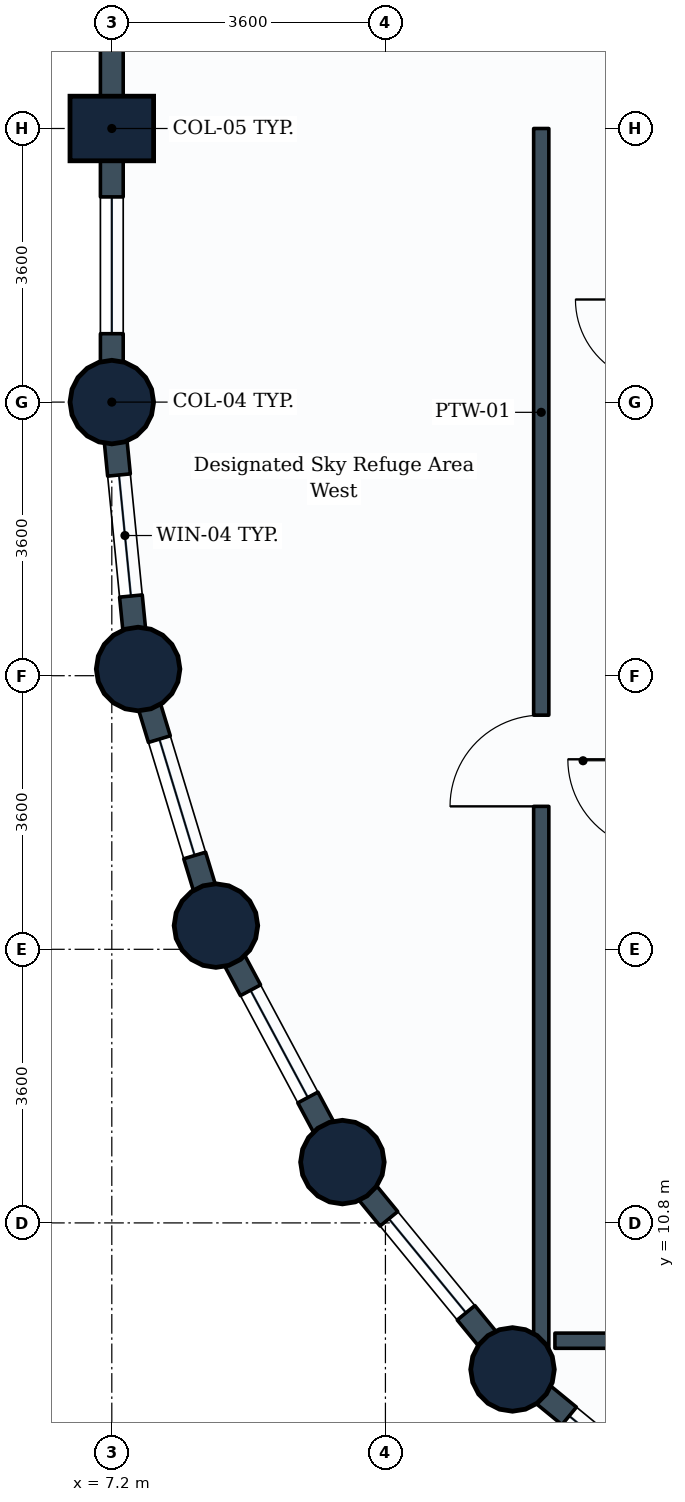
"""IFC4 building model, lengths in metres.
Left out: names, types, materials, properties, quantities, classifications, styles, units other than length and angle.
Written with IfcOpenShell. Run it as: python <this file> out.ifc"""

import sys

from ifc_helpers import new_model, si_unit, direction, frame, frame_2d, origin, origin_2d, place, context, subcontext, project, spatial, rectangle, circle, extrude, element, fill, save


model = new_model("IFC4")
c1 = context("Model", 3, precision=1e-05, world=origin(), true_north=direction((0.0, 1.0)))
c2 = subcontext(c1, "Body", "Model", "MODEL_VIEW")
j1 = project(units=[si_unit("LENGTHUNIT", "METRE"), si_unit("PLANEANGLEUNIT", "RADIAN")], contexts=[c1])
p1 = place(None, origin())
s1 = spatial("IfcSite", under=j1, at=p1, CompositionType="ELEMENT")
p2 = place(p1, origin())
s2 = spatial("IfcBuilding", under=s1, at=p2, CompositionType="ELEMENT")
p3 = place(p2, frame((0.0, 0.0, 120.0)))
s3 = spatial("IfcBuildingStorey", under=s2, at=p3, CompositionType="ELEMENT", Elevation=120.0)
p4 = place(p3, frame((7.2, 21.6, 0.0), z_axis=(0.0, 0.0, 1.0), x_axis=(1.0, 0.0, 0.0)))
e1 = element("IfcColumn", 1, at=p4, inside=s3, PredefinedType="COLUMN", context=c2, shape_type="SweptSolid", body=[
    extrude(circle(Radius=0.55, at=origin_2d()), origin(), (0.0, 0.0, 1.0), 3.8),
])
p5 = place(p3, frame((7.2, 25.2, 0.0), z_axis=(0.0, 0.0, 1.0), x_axis=(0.0, 1.0, 0.0)))
e2 = element("IfcColumn", 2, at=p5, inside=s3, PredefinedType="COLUMN", context=c2, shape_type="SweptSolid", body=[
    extrude(rectangle(XDim=0.85, YDim=1.1, at=origin_2d()), origin(), (0.0, 0.0, 1.0), 3.8),
])
for number, where, z_axis, x_axis in (
    (3, (7.546, 18.088, 0.0), (0.0, 0.0, 1.0), (1.0, 0.0, 0.0)),
    (4, (8.57, 14.712, 0.0), (0.0, 0.0, 1.0), (1.0, 0.0, 0.0)),
    (5, (10.234, 11.6, 0.0), (0.0, 0.0, 1.0), (1.0, 0.0, 0.0)),
    (6, (12.472, 8.872, 0.0), (0.0, 0.0, 1.0), (1.0, 0.0, 0.0)),
):
    element("IfcColumn", number, at=place(p3, frame(where, z_axis=z_axis, x_axis=x_axis)), inside=s3, PredefinedType="COLUMN", context=c2, shape_type="SweptSolid", body=[
        extrude(circle(Radius=0.55, at=origin_2d()), origin(), (0.0, 0.0, 1.0), 3.8),
    ])
p6 = place(p3, frame((7.2, 25.2, 0.0), z_axis=(0.0, 0.0, 1.0), x_axis=(0.0, 1.0, 0.0)))
e7 = element("IfcWall", 7, at=p6, inside=s3, PredefinedType="STANDARD", context=c2, shape_type="SweptSolid", body=[
    extrude(rectangle(XDim=3.6, YDim=0.3, at=frame_2d((1.8, 0.0))), origin(), (0.0, 0.0, 1.0), 2.93),
])
p7 = place(p3, frame((7.2, 21.6, 0.0), z_axis=(0.0, 0.0, 1.0), x_axis=(0.0, 1.0, 0.0)))
e8 = element("IfcWall", 8, at=p7, inside=s3, PredefinedType="STANDARD", context=c2, shape_type="SweptSolid", body=[
    extrude(rectangle(XDim=3.6, YDim=0.3, at=frame_2d((1.8, 0.0))), origin(), (0.0, 0.0, 1.0), 2.93),
])
p8 = place(p7, frame((0.9, 0.0, 0.85)))
e9 = element("IfcOpeningElement", 9, at=p8, cuts=e8, PredefinedType="OPENING", context=c2, shape_type="SweptSolid", body=[
    extrude(rectangle(XDim=1.8, YDim=1.35, at=frame_2d((0.9, 0.675))), frame((0.0, 0.16, 0.0), z_axis=(0.0, -1.0, 0.0), x_axis=(1.0, 0.0, 0.0)), (0.0, 0.0, 1.0), 0.32),
])
p9 = place(p3, frame((7.546, 18.088, 0.0), z_axis=(0.0, 0.0, 1.0), x_axis=(-0.09802417461, 0.995184033831, 0.0)))
e10 = element("IfcWall", 10, at=p9, inside=s3, PredefinedType="STANDARD", context=c2, shape_type="SweptSolid", body=[
    extrude(rectangle(XDim=3.529, YDim=0.3, at=frame_2d((1.765, 0.0))), origin(), (0.0, 0.0, 1.0), 2.93),
])
p10 = place(p9, frame((0.965, 0.0, 0.85)))
e11 = element("IfcOpeningElement", 11, at=p10, cuts=e10, PredefinedType="OPENING", context=c2, shape_type="SweptSolid", body=[
    extrude(rectangle(XDim=1.6, YDim=1.35, at=frame_2d((0.8, 0.675))), frame((0.0, 0.16, 0.0), z_axis=(0.0, -1.0, 0.0), x_axis=(1.0, 0.0, 0.0)), (0.0, 0.0, 1.0), 0.32),
])
p11 = place(p3, frame((8.57, 14.712, 0.0), z_axis=(0.0, 0.0, 1.0), x_axis=(-0.290305086481, 0.956934144423, 0.0)))
e12 = element("IfcWall", 12, at=p11, inside=s3, PredefinedType="STANDARD", context=c2, shape_type="SweptSolid", body=[
    extrude(rectangle(XDim=3.528, YDim=0.3, at=frame_2d((1.764, 0.0))), origin(), (0.0, 0.0, 1.0), 2.93),
])
p12 = place(p11, frame((0.964, 0.0, 0.85)))
e13 = element("IfcOpeningElement", 13, at=p12, cuts=e12, PredefinedType="OPENING", context=c2, shape_type="SweptSolid", body=[
    extrude(rectangle(XDim=1.6, YDim=1.35, at=frame_2d((0.8, 0.675))), frame((0.0, 0.16, 0.0), z_axis=(0.0, -1.0, 0.0), x_axis=(1.0, 0.0, 0.0)), (0.0, 0.0, 1.0), 0.32),
])
p13 = place(p3, frame((10.234, 11.6, 0.0), z_axis=(0.0, 0.0, 1.0), x_axis=(-0.47151087309, 0.881860247748, 0.0)))
e14 = element("IfcWall", 14, at=p13, inside=s3, PredefinedType="STANDARD", context=c2, shape_type="SweptSolid", body=[
    extrude(rectangle(XDim=3.529, YDim=0.3, at=frame_2d((1.764, 0.0))), origin(), (0.0, 0.0, 1.0), 2.93),
])
p14 = place(p13, frame((0.964, 0.0, 0.85)))
e15 = element("IfcOpeningElement", 15, at=p14, cuts=e14, PredefinedType="OPENING", context=c2, shape_type="SweptSolid", body=[
    extrude(rectangle(XDim=1.6, YDim=1.35, at=frame_2d((0.8, 0.675))), frame((0.0, 0.16, 0.0), z_axis=(0.0, -1.0, 0.0), x_axis=(1.0, 0.0, 0.0)), (0.0, 0.0, 1.0), 0.32),
])
p15 = place(p3, frame((12.472, 8.872, 0.0), z_axis=(0.0, 0.0, 1.0), x_axis=(-0.634258295121, 0.773121216285, 0.0)))
e16 = element("IfcWall", 16, at=p15, inside=s3, PredefinedType="STANDARD", context=c2, shape_type="SweptSolid", body=[
    extrude(rectangle(XDim=3.529, YDim=0.3, at=frame_2d((1.764, 0.0))), origin(), (0.0, 0.0, 1.0), 2.93),
])
p16 = place(p15, frame((0.964, 0.0, 0.85)))
e17 = element("IfcOpeningElement", 17, at=p16, cuts=e16, PredefinedType="OPENING", context=c2, shape_type="SweptSolid", body=[
    extrude(rectangle(XDim=1.6, YDim=1.35, at=frame_2d((0.8, 0.675))), frame((0.0, 0.16, 0.0), z_axis=(0.0, -1.0, 0.0), x_axis=(1.0, 0.0, 0.0)), (0.0, 0.0, 1.0), 0.32),
])
p17 = place(p3, frame((15.2, 6.634, 0.0), z_axis=(0.0, 0.0, 1.0), x_axis=(-0.773121216285, 0.634258295121, 0.0)))
e18 = element("IfcWall", 18, at=p17, inside=s3, PredefinedType="STANDARD", context=c2, shape_type="SweptSolid", body=[
    extrude(rectangle(XDim=3.529, YDim=0.3, at=frame_2d((1.764, 0.0))), origin(), (0.0, 0.0, 1.0), 2.93),
])
p18 = place(p17, frame((0.964, 0.0, 0.85)))
e19 = element("IfcOpeningElement", 19, at=p18, cuts=e18, PredefinedType="OPENING", context=c2, shape_type="SweptSolid", body=[
    extrude(rectangle(XDim=1.6, YDim=1.35, at=frame_2d((0.8, 0.675))), frame((0.0, 0.16, 0.0), z_axis=(0.0, -1.0, 0.0), x_axis=(1.0, 0.0, 0.0)), (0.0, 0.0, 1.0), 0.32),
])
p19 = place(p3, frame((12.85, 8.716, 0.0), z_axis=(0.0, 0.0, 1.0), x_axis=(0.0, 1.0, 0.0)))
e20 = element("IfcWall", 20, at=p19, inside=s3, PredefinedType="PARTITIONING", context=c2, shape_type="SweptSolid", body=[
    extrude(rectangle(XDim=16.484, YDim=0.2, at=frame_2d((8.242, 0.0))), origin(), (0.0, 0.0, 1.0), 2.93),
])
p20 = place(p19, frame((7.565, 0.0, 0.0)))
e21 = element("IfcOpeningElement", 21, at=p20, cuts=e20, PredefinedType="OPENING", context=c2, shape_type="SweptSolid", body=[
    extrude(rectangle(XDim=1.2, YDim=2.1, at=frame_2d((0.6, 1.05))), frame((0.0, 0.11, 0.0), z_axis=(0.0, -1.0, 0.0), x_axis=(1.0, 0.0, 0.0)), (0.0, 0.0, 1.0), 0.22),
])
p21 = place(p3, frame((13.03, 9.25, 0.0), z_axis=(0.0, 0.0, 1.0), x_axis=(1.0, 0.0, 0.0)))
e22 = element("IfcWall", 22, at=p21, inside=s3, PredefinedType="PARTITIONING", context=c2, shape_type="SweptSolid", body=[
    extrude(rectangle(XDim=15.77, YDim=0.2, at=frame_2d((7.885, 0.0))), origin(), (0.0, 0.0, 1.0), 3.08),
])
p22 = place(p21, frame((4.697, 0.0, 0.0)))
e23 = element("IfcOpeningElement", 23, at=p22, cuts=e22, PredefinedType="OPENING", context=c2, shape_type="SweptSolid", body=[
    extrude(rectangle(XDim=1.2, YDim=2.1, at=frame_2d((0.6, 1.05))), frame((0.0, 0.11, 0.0), z_axis=(0.0, -1.0, 0.0), x_axis=(1.0, 0.0, 0.0)), (0.0, 0.0, 1.0), 0.22),
])
p23 = place(p8, origin())
e24 = element("IfcWindow", 24, at=p23, inside=s3, PartitioningType="SINGLE_PANEL", PredefinedType="WINDOW", context=c2, shape_type="SweptSolid", body=[
    extrude(rectangle(XDim=1.8, YDim=1.35, at=frame_2d((0.9, 0.675))), frame((0.0, 0.03, 0.0), z_axis=(0.0, -1.0, 0.0), x_axis=(1.0, 0.0, 0.0)), (0.0, 0.0, 1.0), 0.06),
])
fill(e9, e24)
p24 = place(p10, origin())
e25 = element("IfcWindow", 25, at=p24, inside=s3, PartitioningType="SINGLE_PANEL", PredefinedType="WINDOW", context=c2, shape_type="SweptSolid", body=[
    extrude(rectangle(XDim=1.6, YDim=1.35, at=frame_2d((0.8, 0.675))), frame((0.0, 0.03, 0.0), z_axis=(0.0, -1.0, 0.0), x_axis=(1.0, 0.0, 0.0)), (0.0, 0.0, 1.0), 0.06),
])
fill(e11, e25)
p25 = place(p12, origin())
e26 = element("IfcWindow", 26, at=p25, inside=s3, PartitioningType="SINGLE_PANEL", PredefinedType="WINDOW", context=c2, shape_type="SweptSolid", body=[
    extrude(rectangle(XDim=1.6, YDim=1.35, at=frame_2d((0.8, 0.675))), frame((0.0, 0.03, 0.0), z_axis=(0.0, -1.0, 0.0), x_axis=(1.0, 0.0, 0.0)), (0.0, 0.0, 1.0), 0.06),
])
fill(e13, e26)
p26 = place(p14, origin())
e27 = element("IfcWindow", 27, at=p26, inside=s3, PartitioningType="SINGLE_PANEL", PredefinedType="WINDOW", context=c2, shape_type="SweptSolid", body=[
    extrude(rectangle(XDim=1.6, YDim=1.35, at=frame_2d((0.8, 0.675))), frame((0.0, 0.03, 0.0), z_axis=(0.0, -1.0, 0.0), x_axis=(1.0, 0.0, 0.0)), (0.0, 0.0, 1.0), 0.06),
])
fill(e15, e27)
p27 = place(p16, origin())
e28 = element("IfcWindow", 28, at=p27, inside=s3, PartitioningType="SINGLE_PANEL", PredefinedType="WINDOW", context=c2, shape_type="SweptSolid", body=[
    extrude(rectangle(XDim=1.6, YDim=1.35, at=frame_2d((0.8, 0.675))), frame((0.0, 0.03, 0.0), z_axis=(0.0, -1.0, 0.0), x_axis=(1.0, 0.0, 0.0)), (0.0, 0.0, 1.0), 0.06),
])
fill(e17, e28)
p28 = place(p18, origin())
e29 = element("IfcWindow", 29, at=p28, inside=s3, PartitioningType="SINGLE_PANEL", PredefinedType="WINDOW", context=c2, shape_type="SweptSolid", body=[
    extrude(rectangle(XDim=1.6, YDim=1.35, at=frame_2d((0.8, 0.675))), frame((0.0, 0.03, 0.0), z_axis=(0.0, -1.0, 0.0), x_axis=(1.0, 0.0, 0.0)), (0.0, 0.0, 1.0), 0.06),
])
fill(e19, e29)
p29 = place(p20, origin())
e30 = element("IfcDoor", 30, at=p29, inside=s3, OperationType="SINGLE_SWING_LEFT", PredefinedType="DOOR", context=c2, shape_type="SweptSolid", body=[
    extrude(rectangle(XDim=1.2, YDim=2.1, at=frame_2d((0.6, 1.05))), frame((0.0, 0.025, 0.0), z_axis=(0.0, -1.0, 0.0), x_axis=(1.0, 0.0, 0.0)), (0.0, 0.0, 1.0), 0.05),
])
fill(e21, e30)
save(model, sys.argv[1])
